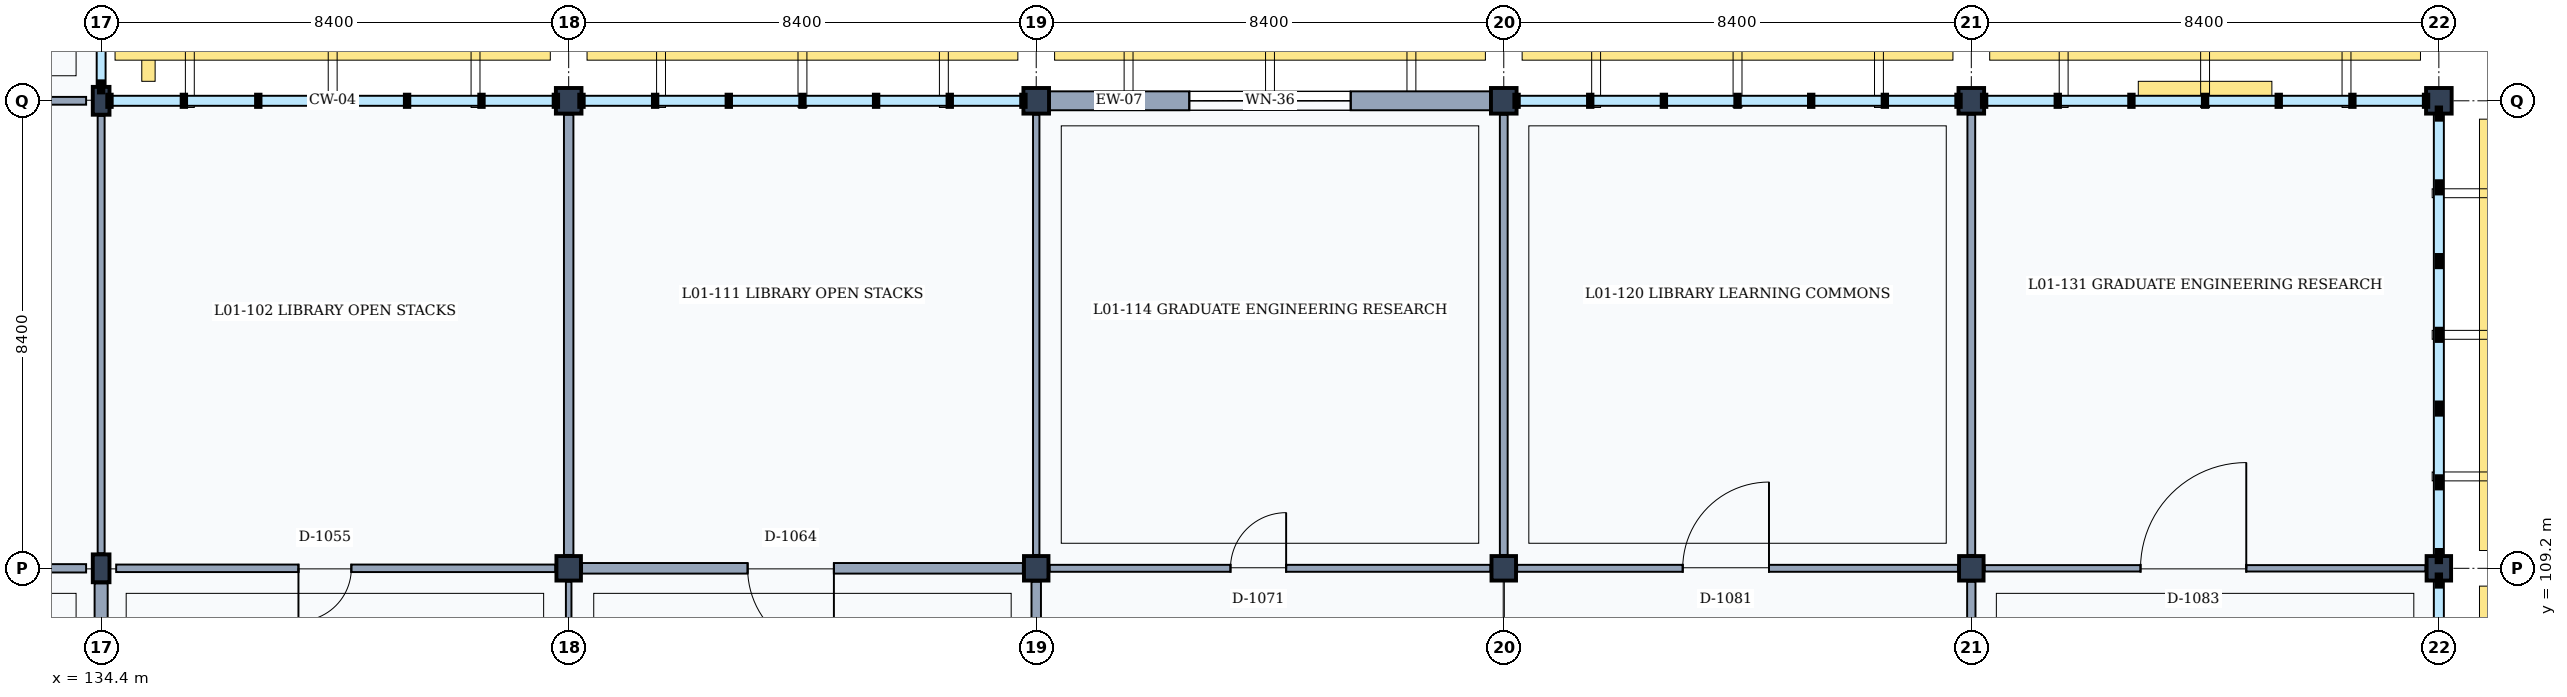
"""IFC4 building model, lengths in metres.
Left out: names, types, materials, properties, quantities, classifications, styles, units other than length and angle.
Written with IfcOpenShell. Run it as: python <this file> out.ifc"""

import sys

from ifc_helpers import new_model, si_unit, direction, frame, frame_2d, origin, origin_2d, place, context, subcontext, project, spatial, rectangle, i_section, extrude, element, fill, save


model = new_model("IFC4")
c1 = context("Model", 3, precision=1e-05, world=origin(), true_north=direction((0.0, 1.0)))
c2 = subcontext(c1, "Body", "Model", "MODEL_VIEW")
j1 = project(units=[si_unit("LENGTHUNIT", "METRE"), si_unit("PLANEANGLEUNIT", "RADIAN")], contexts=[c1])
p1 = place(None, origin())
s1 = spatial("IfcSite", under=j1, at=p1, CompositionType="ELEMENT")
p2 = place(p1, origin())
s2 = spatial("IfcBuilding", under=s1, at=p2, CompositionType="ELEMENT")
p3 = place(p2, frame((0.0, 0.0, 4.8)))
s3 = spatial("IfcBuildingStorey", under=s2, at=p3, CompositionType="ELEMENT", Elevation=4.8)
for number, where, z_axis, x_axis in (
    (1, (134.4, 109.2, 0.0), (0.0, 0.0, 1.0), (1.0, 0.0, 0.0)),
    (2, (134.4, 117.6, 0.0), (0.0, 0.0, 1.0), (1.0, 0.0, 0.0)),
):
    element("IfcColumn", number, at=place(p3, frame(where, z_axis=z_axis, x_axis=x_axis)), inside=s3, PredefinedType="COLUMN", context=c2, shape_type="SweptSolid", body=[
        extrude(i_section(OverallWidth=0.3, OverallDepth=0.5, WebThickness=0.014, FlangeThickness=0.028, FilletRadius=0.027, at=origin_2d()), origin(), (0.0, 0.0, 1.0), 4.8),
    ])
p4 = place(p3, frame((142.8, 109.2, 0.0), z_axis=(0.0, 0.0, 1.0), x_axis=(1.0, 0.0, 0.0)))
e3 = element("IfcColumn", 3, at=p4, inside=s3, PredefinedType="COLUMN", context=c2, shape_type="SweptSolid", body=[
    extrude(rectangle(XDim=0.44, YDim=0.44, at=origin_2d()), origin(), (0.0, 0.0, 1.0), 4.8),
])
p5 = place(p3, frame((142.8, 117.6, 0.0), z_axis=(0.0, 0.0, 1.0), x_axis=(1.0, 0.0, 0.0)))
e4 = element("IfcColumn", 4, at=p5, inside=s3, PredefinedType="COLUMN", context=c2, shape_type="SweptSolid", body=[
    extrude(rectangle(XDim=0.46, YDim=0.46, at=origin_2d()), origin(), (0.0, 0.0, 1.0), 4.8),
])
p6 = place(p3, frame((151.2, 109.2, 0.0), z_axis=(0.0, 0.0, 1.0), x_axis=(1.0, 0.0, 0.0)))
e5 = element("IfcColumn", 5, at=p6, inside=s3, PredefinedType="COLUMN", context=c2, shape_type="SweptSolid", body=[
    extrude(rectangle(XDim=0.44, YDim=0.44, at=origin_2d()), origin(), (0.0, 0.0, 1.0), 4.8),
])
p7 = place(p3, frame((151.2, 117.6, 0.0), z_axis=(0.0, 0.0, 1.0), x_axis=(1.0, 0.0, 0.0)))
e6 = element("IfcColumn", 6, at=p7, inside=s3, PredefinedType="COLUMN", context=c2, shape_type="SweptSolid", body=[
    extrude(rectangle(XDim=0.46, YDim=0.46, at=origin_2d()), origin(), (0.0, 0.0, 1.0), 4.8),
])
p8 = place(p3, frame((159.6, 109.2, 0.0), z_axis=(0.0, 0.0, 1.0), x_axis=(1.0, 0.0, 0.0)))
e7 = element("IfcColumn", 7, at=p8, inside=s3, PredefinedType="COLUMN", context=c2, shape_type="SweptSolid", body=[
    extrude(rectangle(XDim=0.44, YDim=0.44, at=origin_2d()), origin(), (0.0, 0.0, 1.0), 4.8),
])
p9 = place(p3, frame((159.6, 117.6, 0.0), z_axis=(0.0, 0.0, 1.0), x_axis=(1.0, 0.0, 0.0)))
e8 = element("IfcColumn", 8, at=p9, inside=s3, PredefinedType="COLUMN", context=c2, shape_type="SweptSolid", body=[
    extrude(rectangle(XDim=0.46, YDim=0.46, at=origin_2d()), origin(), (0.0, 0.0, 1.0), 4.8),
])
p10 = place(p3, frame((168.0, 109.2, 0.0), z_axis=(0.0, 0.0, 1.0), x_axis=(1.0, 0.0, 0.0)))
e9 = element("IfcColumn", 9, at=p10, inside=s3, PredefinedType="COLUMN", context=c2, shape_type="SweptSolid", body=[
    extrude(rectangle(XDim=0.44, YDim=0.44, at=origin_2d()), origin(), (0.0, 0.0, 1.0), 4.8),
])
p11 = place(p3, frame((168.0, 117.6, 0.0), z_axis=(0.0, 0.0, 1.0), x_axis=(1.0, 0.0, 0.0)))
e10 = element("IfcColumn", 10, at=p11, inside=s3, PredefinedType="COLUMN", context=c2, shape_type="SweptSolid", body=[
    extrude(rectangle(XDim=0.46, YDim=0.46, at=origin_2d()), origin(), (0.0, 0.0, 1.0), 4.8),
])
p12 = place(p3, frame((176.4, 109.2, 0.0), z_axis=(0.0, 0.0, 1.0), x_axis=(1.0, 0.0, 0.0)))
e11 = element("IfcColumn", 11, at=p12, inside=s3, PredefinedType="COLUMN", context=c2, shape_type="SweptSolid", body=[
    extrude(rectangle(XDim=0.44, YDim=0.44, at=origin_2d()), origin(), (0.0, 0.0, 1.0), 4.8),
])
p13 = place(p3, frame((176.4, 117.6, 0.0), z_axis=(0.0, 0.0, 1.0), x_axis=(1.0, 0.0, 0.0)))
e12 = element("IfcColumn", 12, at=p13, inside=s3, PredefinedType="COLUMN", context=c2, shape_type="SweptSolid", body=[
    extrude(rectangle(XDim=0.46, YDim=0.46, at=origin_2d()), origin(), (0.0, 0.0, 1.0), 4.8),
])
p14 = place(p3, frame((151.43, 117.6, 0.0), z_axis=(0.0, 0.0, 1.0), x_axis=(1.0, 0.0, 0.0)))
e13 = element("IfcWall", 13, at=p14, inside=s3, PredefinedType="SOLIDWALL", context=c2, shape_type="SweptSolid", body=[
    extrude(rectangle(XDim=7.94, YDim=0.34, at=frame_2d((3.97, 0.0))), origin(), (0.0, 0.0, 1.0), 3.96),
])
p15 = place(p14, frame((2.52, 0.0, 0.9)))
e14 = element("IfcOpeningElement", 14, at=p15, cuts=e13, PredefinedType="OPENING", context=c2, shape_type="SweptSolid", body=[
    extrude(rectangle(XDim=2.9, YDim=1.75, at=frame_2d((1.45, 0.875))), frame((0.0, 0.18, 0.0), z_axis=(0.0, -1.0, 0.0), x_axis=(1.0, 0.0, 0.0)), (0.0, 0.0, 1.0), 0.36),
])
p16 = place(p3, frame((134.4, 101.07, 0.0), z_axis=(0.0, 0.0, 1.0), x_axis=(0.0, 1.0, 0.0)))
e15 = element("IfcWall", 15, at=p16, inside=s3, PredefinedType="PARTITIONING", context=c2, shape_type="SweptSolid", body=[
    extrude(rectangle(XDim=7.86, YDim=0.235, at=frame_2d((3.93, 0.0))), origin(), (0.0, 0.0, 1.0), 3.92),
])
p17 = place(p3, frame((126.23, 109.2, 0.0), z_axis=(0.0, 0.0, 1.0), x_axis=(1.0, 0.0, 0.0)))
e16 = element("IfcWall", 16, at=p17, inside=s3, PredefinedType="PARTITIONING", context=c2, shape_type="SweptSolid", body=[
    extrude(rectangle(XDim=7.9, YDim=0.15, at=frame_2d((3.95, 0.0))), origin(), (0.0, 0.0, 1.0), 3.92),
])
p18 = place(p17, frame((2.925, 0.0, 0.0)))
e17 = element("IfcOpeningElement", 17, at=p18, cuts=e16, PredefinedType="OPENING", context=c2, shape_type="SweptSolid", body=[
    extrude(rectangle(XDim=1.65, YDim=2.25, at=frame_2d((0.825, 1.125))), frame((0.0, 0.085, 0.0), z_axis=(0.0, -1.0, 0.0), x_axis=(1.0, 0.0, 0.0)), (0.0, 0.0, 1.0), 0.17),
])
p19 = place(p3, frame((134.4, 109.47, 0.0), z_axis=(0.0, 0.0, 1.0), x_axis=(0.0, 1.0, 0.0)))
e18 = element("IfcWall", 18, at=p19, inside=s3, PredefinedType="PARTITIONING", context=c2, shape_type="SweptSolid", body=[
    extrude(rectangle(XDim=7.86, YDim=0.125, at=frame_2d((3.93, 0.0))), origin(), (0.0, 0.0, 1.0), 3.92),
])
p20 = place(p3, frame((126.23, 117.6, 0.0), z_axis=(0.0, 0.0, 1.0), x_axis=(1.0, 0.0, 0.0)))
e19 = element("IfcWall", 19, at=p20, inside=s3, PredefinedType="PARTITIONING", context=c2, shape_type="SweptSolid", body=[
    extrude(rectangle(XDim=7.9, YDim=0.14, at=frame_2d((3.95, 0.0))), origin(), (0.0, 0.0, 1.0), 3.92),
])
p21 = place(p20, frame((3.225, 0.0, 0.0)))
e20 = element("IfcOpeningElement", 20, at=p21, cuts=e19, PredefinedType="OPENING", context=c2, shape_type="SweptSolid", body=[
    extrude(rectangle(XDim=1.05, YDim=2.2, at=frame_2d((0.525, 1.1))), frame((0.0, 0.08, 0.0), z_axis=(0.0, -1.0, 0.0), x_axis=(1.0, 0.0, 0.0)), (0.0, 0.0, 1.0), 0.16),
])
p22 = place(p3, frame((142.8, 101.05, 0.0), z_axis=(0.0, 0.0, 1.0), x_axis=(0.0, 1.0, 0.0)))
e21 = element("IfcWall", 21, at=p22, inside=s3, PredefinedType="MOVABLE", context=c2, shape_type="SweptSolid", body=[
    extrude(rectangle(XDim=7.91, YDim=0.1, at=frame_2d((3.955, 0.0))), origin(), (0.0, 0.0, 1.0), 3.92),
])
p23 = place(p3, frame((134.67, 109.2, 0.0), z_axis=(0.0, 0.0, 1.0), x_axis=(1.0, 0.0, 0.0)))
e22 = element("IfcWall", 22, at=p23, inside=s3, PredefinedType="PARTITIONING", context=c2, shape_type="SweptSolid", body=[
    extrude(rectangle(XDim=7.89, YDim=0.135, at=frame_2d((3.945, 0.0))), origin(), (0.0, 0.0, 1.0), 3.91),
])
p24 = place(p23, frame((3.275, 0.0, 0.0)))
e23 = element("IfcOpeningElement", 23, at=p24, cuts=e22, PredefinedType="OPENING", context=c2, shape_type="SweptSolid", body=[
    extrude(rectangle(XDim=0.95, YDim=2.15, at=frame_2d((0.475, 1.075))), frame((0.0, 0.077, 0.0), z_axis=(0.0, -1.0, 0.0), x_axis=(1.0, 0.0, 0.0)), (0.0, 0.0, 1.0), 0.155),
])
p25 = place(p3, frame((142.8, 109.44, 0.0), z_axis=(0.0, 0.0, 1.0), x_axis=(0.0, 1.0, 0.0)))
e24 = element("IfcWall", 24, at=p25, inside=s3, PredefinedType="PARTITIONING", context=c2, shape_type="SweptSolid", body=[
    extrude(rectangle(XDim=7.91, YDim=0.17, at=frame_2d((3.955, 0.0))), origin(), (0.0, 0.0, 1.0), 3.92),
])
p26 = place(p3, frame((151.2, 101.05, 0.0), z_axis=(0.0, 0.0, 1.0), x_axis=(0.0, 1.0, 0.0)))
e25 = element("IfcWall", 25, at=p26, inside=s3, PredefinedType="PARTITIONING", context=c2, shape_type="SweptSolid", body=[
    extrude(rectangle(XDim=7.91, YDim=0.17, at=frame_2d((3.955, 0.0))), origin(), (0.0, 0.0, 1.0), 3.92),
])
p27 = place(p26, frame((3.1, 0.0, 0.0)))
e26 = element("IfcOpeningElement", 26, at=p27, cuts=e25, PredefinedType="OPENING", context=c2, shape_type="SweptSolid", body=[
    extrude(rectangle(XDim=1.3, YDim=2.2, at=frame_2d((0.65, 1.1))), frame((0.0, 0.095, 0.0), z_axis=(0.0, -1.0, 0.0), x_axis=(1.0, 0.0, 0.0)), (0.0, 0.0, 1.0), 0.19),
])
p28 = place(p3, frame((143.04, 109.2, 0.0), z_axis=(0.0, 0.0, 1.0), x_axis=(1.0, 0.0, 0.0)))
e27 = element("IfcWall", 27, at=p28, inside=s3, PredefinedType="PARTITIONING", context=c2, shape_type="SweptSolid", body=[
    extrude(rectangle(XDim=7.92, YDim=0.19, at=frame_2d((3.96, 0.0))), origin(), (0.0, 0.0, 1.0), 3.92),
])
p29 = place(p28, frame((2.975, 0.0, 0.0)))
e28 = element("IfcOpeningElement", 28, at=p29, cuts=e27, PredefinedType="OPENING", context=c2, shape_type="SweptSolid", body=[
    extrude(rectangle(XDim=1.55, YDim=2.35, at=frame_2d((0.775, 1.175))), frame((0.0, 0.105, 0.0), z_axis=(0.0, -1.0, 0.0), x_axis=(1.0, 0.0, 0.0)), (0.0, 0.0, 1.0), 0.21),
])
p30 = place(p3, frame((151.2, 109.44, 0.0), z_axis=(0.0, 0.0, 1.0), x_axis=(0.0, 1.0, 0.0)))
e29 = element("IfcWall", 29, at=p30, inside=s3, PredefinedType="PARTITIONING", context=c2, shape_type="SweptSolid", body=[
    extrude(rectangle(XDim=7.91, YDim=0.115, at=frame_2d((3.955, 0.0))), origin(), (0.0, 0.0, 1.0), 3.92),
])
p31 = place(p3, frame((151.44, 109.2, 0.0), z_axis=(0.0, 0.0, 1.0), x_axis=(1.0, 0.0, 0.0)))
e30 = element("IfcWall", 30, at=p31, inside=s3, PredefinedType="PARTITIONING", context=c2, shape_type="SweptSolid", body=[
    extrude(rectangle(XDim=7.92, YDim=0.125, at=frame_2d((3.96, 0.0))), origin(), (0.0, 0.0, 1.0), 3.92),
])
p32 = place(p31, frame((3.25, 0.0, 0.0)))
e31 = element("IfcOpeningElement", 31, at=p32, cuts=e30, PredefinedType="OPENING", context=c2, shape_type="SweptSolid", body=[
    extrude(rectangle(XDim=1.0, YDim=2.15, at=frame_2d((0.5, 1.075))), frame((0.0, 0.073, 0.0), z_axis=(0.0, -1.0, 0.0), x_axis=(1.0, 0.0, 0.0)), (0.0, 0.0, 1.0), 0.145),
])
p33 = place(p3, frame((159.6, 109.44, 0.0), z_axis=(0.0, 0.0, 1.0), x_axis=(0.0, 1.0, 0.0)))
e32 = element("IfcWall", 32, at=p33, inside=s3, PredefinedType="PARTITIONING", context=c2, shape_type="SweptSolid", body=[
    extrude(rectangle(XDim=7.91, YDim=0.14, at=frame_2d((3.955, 0.0))), origin(), (0.0, 0.0, 1.0), 3.92),
])
p34 = place(p3, frame((168.0, 101.05, 0.0), z_axis=(0.0, 0.0, 1.0), x_axis=(0.0, 1.0, 0.0)))
e33 = element("IfcWall", 33, at=p34, inside=s3, PredefinedType="PARTITIONING", context=c2, shape_type="SweptSolid", body=[
    extrude(rectangle(XDim=7.91, YDim=0.15, at=frame_2d((3.955, 0.0))), origin(), (0.0, 0.0, 1.0), 3.92),
])
p35 = place(p34, frame((3.1, 0.0, 0.0)))
e34 = element("IfcOpeningElement", 34, at=p35, cuts=e33, PredefinedType="OPENING", context=c2, shape_type="SweptSolid", body=[
    extrude(rectangle(XDim=1.3, YDim=2.2, at=frame_2d((0.65, 1.1))), frame((0.0, 0.085, 0.0), z_axis=(0.0, -1.0, 0.0), x_axis=(1.0, 0.0, 0.0)), (0.0, 0.0, 1.0), 0.17),
])
p36 = place(p3, frame((159.84, 109.2, 0.0), z_axis=(0.0, 0.0, 1.0), x_axis=(1.0, 0.0, 0.0)))
e35 = element("IfcWall", 35, at=p36, inside=s3, PredefinedType="PARTITIONING", context=c2, shape_type="SweptSolid", body=[
    extrude(rectangle(XDim=7.92, YDim=0.125, at=frame_2d((3.96, 0.0))), origin(), (0.0, 0.0, 1.0), 3.92),
])
p37 = place(p36, frame((2.975, 0.0, 0.0)))
e36 = element("IfcOpeningElement", 36, at=p37, cuts=e35, PredefinedType="OPENING", context=c2, shape_type="SweptSolid", body=[
    extrude(rectangle(XDim=1.55, YDim=2.35, at=frame_2d((0.775, 1.175))), frame((0.0, 0.073, 0.0), z_axis=(0.0, -1.0, 0.0), x_axis=(1.0, 0.0, 0.0)), (0.0, 0.0, 1.0), 0.145),
])
p38 = place(p3, frame((168.0, 109.44, 0.0), z_axis=(0.0, 0.0, 1.0), x_axis=(0.0, 1.0, 0.0)))
e37 = element("IfcWall", 37, at=p38, inside=s3, PredefinedType="PARTITIONING", context=c2, shape_type="SweptSolid", body=[
    extrude(rectangle(XDim=7.91, YDim=0.14, at=frame_2d((3.955, 0.0))), origin(), (0.0, 0.0, 1.0), 3.92),
])
p39 = place(p3, frame((168.24, 109.2, 0.0), z_axis=(0.0, 0.0, 1.0), x_axis=(1.0, 0.0, 0.0)))
e38 = element("IfcWall", 38, at=p39, inside=s3, PredefinedType="PARTITIONING", context=c2, shape_type="SweptSolid", body=[
    extrude(rectangle(XDim=7.92, YDim=0.115, at=frame_2d((3.96, 0.0))), origin(), (0.0, 0.0, 1.0), 3.92),
])
p40 = place(p39, frame((2.8, 0.0, 0.0)))
e39 = element("IfcOpeningElement", 39, at=p40, cuts=e38, PredefinedType="OPENING", context=c2, shape_type="SweptSolid", body=[
    extrude(rectangle(XDim=1.9, YDim=2.4, at=frame_2d((0.95, 1.2))), frame((0.0, 0.067, 0.0), z_axis=(0.0, -1.0, 0.0), x_axis=(1.0, 0.0, 0.0)), (0.0, 0.0, 1.0), 0.135),
])
p41 = place(p15, origin())
e40 = element("IfcWindow", 40, at=p41, inside=s3, PartitioningType="SINGLE_PANEL", PredefinedType="WINDOW", context=c2, shape_type="SweptSolid", body=[
    extrude(rectangle(XDim=2.9, YDim=1.75, at=frame_2d((1.45, 0.875))), frame((0.0, 0.03, 0.0), z_axis=(0.0, -1.0, 0.0), x_axis=(1.0, 0.0, 0.0)), (0.0, 0.0, 1.0), 0.06),
])
fill(e14, e40)
p42 = place(p24, frame((0.95, 0.0, 0.0), z_axis=(0.0, 0.0, 1.0), x_axis=(-1.0, 0.0, 0.0)))
e41 = element("IfcDoor", 41, at=p42, inside=s3, OperationType="SINGLE_SWING_RIGHT", PredefinedType="DOOR", context=c2, shape_type="SweptSolid", body=[
    extrude(rectangle(XDim=0.95, YDim=2.15, at=frame_2d((0.475, 1.075))), frame((0.0, 0.025, 0.0), z_axis=(0.0, -1.0, 0.0), x_axis=(1.0, 0.0, 0.0)), (0.0, 0.0, 1.0), 0.05),
])
fill(e23, e41)
p43 = place(p29, frame((1.55, 0.0, 0.0), z_axis=(0.0, 0.0, 1.0), x_axis=(-1.0, 0.0, 0.0)))
e42 = element("IfcDoor", 42, at=p43, inside=s3, OperationType="SINGLE_SWING_LEFT", PredefinedType="DOOR", context=c2, shape_type="SweptSolid", body=[
    extrude(rectangle(XDim=1.55, YDim=2.35, at=frame_2d((0.775, 1.175))), frame((0.0, 0.025, 0.0), z_axis=(0.0, -1.0, 0.0), x_axis=(1.0, 0.0, 0.0)), (0.0, 0.0, 1.0), 0.05),
])
fill(e28, e42)
p44 = place(p32, origin())
e43 = element("IfcDoor", 43, at=p44, inside=s3, OperationType="SINGLE_SWING_RIGHT", PredefinedType="DOOR", context=c2, shape_type="SweptSolid", body=[
    extrude(rectangle(XDim=1.0, YDim=2.15, at=frame_2d((0.5, 1.075))), frame((0.0, 0.025, 0.0), z_axis=(0.0, -1.0, 0.0), x_axis=(1.0, 0.0, 0.0)), (0.0, 0.0, 1.0), 0.05),
])
fill(e31, e43)
p45 = place(p37, origin())
e44 = element("IfcDoor", 44, at=p45, inside=s3, OperationType="SINGLE_SWING_RIGHT", PredefinedType="DOOR", context=c2, shape_type="SweptSolid", body=[
    extrude(rectangle(XDim=1.55, YDim=2.35, at=frame_2d((0.775, 1.175))), frame((0.0, 0.025, 0.0), z_axis=(0.0, -1.0, 0.0), x_axis=(1.0, 0.0, 0.0)), (0.0, 0.0, 1.0), 0.05),
])
fill(e36, e44)
p46 = place(p40, origin())
e45 = element("IfcDoor", 45, at=p46, inside=s3, OperationType="SINGLE_SWING_RIGHT", PredefinedType="DOOR", context=c2, shape_type="SweptSolid", body=[
    extrude(rectangle(XDim=1.9, YDim=2.4, at=frame_2d((0.95, 1.2))), frame((0.0, 0.025, 0.0), z_axis=(0.0, -1.0, 0.0), x_axis=(1.0, 0.0, 0.0)), (0.0, 0.0, 1.0), 0.05),
])
fill(e39, e45)
save(model, sys.argv[1])
